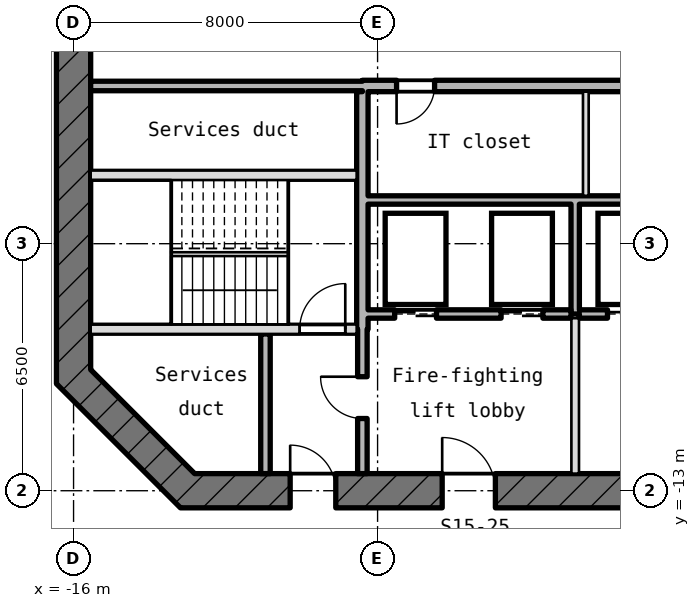
"""IFC4 building model, lengths in metres.
Left out: names, types, materials, properties, quantities, classifications, styles, units other than length and angle.
Written with IfcOpenShell. Run it as: python <this file> out.ifc"""

import sys

from ifc_helpers import new_model, si_unit, direction, frame, frame_2d, origin, place, context, subcontext, project, spatial, rectangle, extrude, element, fill, save


model = new_model("IFC4")
c1 = context("Model", 3, precision=1e-05, world=origin(), true_north=direction((0.0, 1.0)))
c2 = subcontext(c1, "Body", "Model", "MODEL_VIEW")
j1 = project(units=[si_unit("LENGTHUNIT", "METRE"), si_unit("PLANEANGLEUNIT", "RADIAN")], contexts=[c1])
p1 = place(None, origin())
s1 = spatial("IfcSite", under=j1, at=p1, CompositionType="ELEMENT")
p2 = place(p1, origin())
s2 = spatial("IfcBuilding", under=s1, at=p2, CompositionType="ELEMENT")
p3 = place(p2, frame((0.0, 0.0, 223.3)))
s3 = spatial("IfcBuildingStorey", under=s2, at=p3, CompositionType="ELEMENT", Elevation=223.3)
p4 = place(p3, frame((-16.0, 10.186, -0.18), z_axis=(0.0, 0.0, 1.0), x_axis=(0.0, -1.0, 0.0)))
e1 = element("IfcWall", 1, at=p4, inside=s3, PredefinedType="SHEAR", context=c2, shape_type="SweptSolid", body=[
    extrude(rectangle(XDim=20.373, YDim=0.9, at=frame_2d((10.186, 0.0))), origin(), (0.0, 0.0, 1.0), 4.15),
])
p5 = place(p4, frame((8.986, 0.0, 0.18)))
e2 = element("IfcOpeningElement", 2, at=p5, cuts=e1, PredefinedType="OPENING", context=c2, shape_type="SweptSolid", body=[
    extrude(rectangle(XDim=2.4, YDim=2.1, at=frame_2d((1.2, 1.05))), frame((0.0, 0.46, 0.0), z_axis=(0.0, -1.0, 0.0), x_axis=(1.0, 0.0, 0.0)), (0.0, 0.0, 1.0), 0.92),
])
p6 = place(p4, frame((5.586, 0.0, 0.18)))
e3 = element("IfcOpeningElement", 3, at=p6, cuts=e1, PredefinedType="OPENING", context=c2, shape_type="SweptSolid", body=[
    extrude(rectangle(XDim=1.2, YDim=2.1, at=frame_2d((0.6, 1.05))), frame((0.0, 0.46, 0.0), z_axis=(0.0, -1.0, 0.0), x_axis=(1.0, 0.0, 0.0)), (0.0, 0.0, 1.0), 0.92),
])
p7 = place(p3, frame((-16.132, -9.868, -0.18), z_axis=(0.0, 0.0, 1.0), x_axis=(0.707106781187, -0.707106781187, 0.0)))
e4 = element("IfcWall", 4, at=p7, inside=s3, PredefinedType="SHEAR", context=c2, shape_type="SweptSolid", body=[
    extrude(rectangle(XDim=4.615, YDim=0.9, at=frame_2d((2.308, 0.0))), origin(), (0.0, 0.0, 1.0), 4.15),
])
p8 = place(p3, frame((-13.186, -13.0, -0.18), z_axis=(0.0, 0.0, 1.0), x_axis=(1.0, 0.0, 0.0)))
e5 = element("IfcWall", 5, at=p8, inside=s3, PredefinedType="SHEAR", context=c2, shape_type="SweptSolid", body=[
    extrude(rectangle(XDim=26.373, YDim=0.9, at=frame_2d((13.186, 0.0))), origin(), (0.0, 0.0, 1.0), 4.15),
])
p9 = place(p8, frame((2.886, 0.0, 0.18)))
e6 = element("IfcOpeningElement", 6, at=p9, cuts=e5, PredefinedType="OPENING", context=c2, shape_type="SweptSolid", body=[
    extrude(rectangle(XDim=1.2, YDim=2.1, at=frame_2d((0.6, 1.05))), frame((0.0, 0.46, 0.0), z_axis=(0.0, -1.0, 0.0), x_axis=(1.0, 0.0, 0.0)), (0.0, 0.0, 1.0), 0.92),
])
p10 = place(p8, frame((6.886, 0.0, 0.18)))
e7 = element("IfcOpeningElement", 7, at=p10, cuts=e5, PredefinedType="OPENING", context=c2, shape_type="SweptSolid", body=[
    extrude(rectangle(XDim=1.4, YDim=2.1, at=frame_2d((0.7, 1.05))), frame((0.0, 0.46, 0.0), z_axis=(0.0, -1.0, 0.0), x_axis=(1.0, 0.0, 0.0)), (0.0, 0.0, 1.0), 0.92),
])
p11 = place(p8, frame((15.486, 0.0, 0.18)))
e8 = element("IfcOpeningElement", 8, at=p11, cuts=e5, PredefinedType="OPENING", context=c2, shape_type="SweptSolid", body=[
    extrude(rectangle(XDim=1.4, YDim=2.1, at=frame_2d((0.7, 1.05))), frame((0.0, 0.46, 0.0), z_axis=(0.0, -1.0, 0.0), x_axis=(1.0, 0.0, 0.0)), (0.0, 0.0, 1.0), 0.92),
])
p12 = place(p3, frame((-15.55, -8.75, -0.18), z_axis=(0.0, 0.0, 1.0), x_axis=(1.0, 0.0, 0.0)))
e9 = element("IfcWall", 9, at=p12, inside=s3, PredefinedType="SHEAR", context=c2, shape_type="SweptSolid", body=[
    extrude(rectangle(XDim=7.0, YDim=0.25, at=frame_2d((3.5, 0.0))), origin(), (0.0, 0.0, 1.0), 4.15),
])
p13 = place(p12, frame((5.5, 0.0, 0.18)))
e10 = element("IfcOpeningElement", 10, at=p13, cuts=e9, PredefinedType="OPENING", context=c2, shape_type="SweptSolid", body=[
    extrude(rectangle(XDim=1.2, YDim=2.1, at=frame_2d((0.6, 1.05))), frame((0.0, 0.135, 0.0), z_axis=(0.0, -1.0, 0.0), x_axis=(1.0, 0.0, 0.0)), (0.0, 0.0, 1.0), 0.27),
])
p14 = place(p3, frame((-8.25, -8.35, 0.0), z_axis=(0.0, 0.0, 1.0), x_axis=(1.0, 0.0, 0.0)))
e11 = element("IfcWall", 11, at=p14, inside=s3, PredefinedType="STANDARD", context=c2, shape_type="SweptSolid", body=[
    extrude(rectangle(XDim=5.34, YDim=0.22, at=frame_2d((2.67, 0.0))), origin(), (0.0, 0.0, 1.0), 3.97),
])
p15 = place(p14, frame((0.7, 0.0, 0.0)))
e12 = element("IfcOpeningElement", 12, at=p15, cuts=e11, PredefinedType="OPENING", context=c2, shape_type="SweptSolid", body=[
    extrude(rectangle(XDim=1.1, YDim=2.1, at=frame_2d((0.55, 1.05))), frame((0.0, 0.12, 0.0), z_axis=(0.0, -1.0, 0.0), x_axis=(1.0, 0.0, 0.0)), (0.0, 0.0, 1.0), 0.24),
])
p16 = place(p14, frame((3.5, 0.0, 0.0)))
e13 = element("IfcOpeningElement", 13, at=p16, cuts=e11, PredefinedType="OPENING", context=c2, shape_type="SweptSolid", body=[
    extrude(rectangle(XDim=1.1, YDim=2.1, at=frame_2d((0.55, 1.05))), frame((0.0, 0.12, 0.0), z_axis=(0.0, -1.0, 0.0), x_axis=(1.0, 0.0, 0.0)), (0.0, 0.0, 1.0), 0.24),
])
p17 = place(p3, frame((-2.69, -8.35, 0.0), z_axis=(0.0, 0.0, 1.0), x_axis=(1.0, 0.0, 0.0)))
e14 = element("IfcWall", 14, at=p17, inside=s3, PredefinedType="STANDARD", context=c2, shape_type="SweptSolid", body=[
    extrude(rectangle(XDim=10.94, YDim=0.22, at=frame_2d((5.47, 0.0))), origin(), (0.0, 0.0, 1.0), 3.97),
])
p18 = place(p17, frame((0.74, 0.0, 0.0)))
e15 = element("IfcOpeningElement", 15, at=p18, cuts=e14, PredefinedType="OPENING", context=c2, shape_type="SweptSolid", body=[
    extrude(rectangle(XDim=1.1, YDim=2.1, at=frame_2d((0.55, 1.05))), frame((0.0, 0.12, 0.0), z_axis=(0.0, -1.0, 0.0), x_axis=(1.0, 0.0, 0.0)), (0.0, 0.0, 1.0), 0.24),
])
p19 = place(p17, frame((3.54, 0.0, 0.0)))
e16 = element("IfcOpeningElement", 16, at=p19, cuts=e14, PredefinedType="OPENING", context=c2, shape_type="SweptSolid", body=[
    extrude(rectangle(XDim=1.1, YDim=2.1, at=frame_2d((0.55, 1.05))), frame((0.0, 0.12, 0.0), z_axis=(0.0, -1.0, 0.0), x_axis=(1.0, 0.0, 0.0)), (0.0, 0.0, 1.0), 0.24),
])
p20 = place(p3, frame((-8.25, -5.35, 0.0), z_axis=(0.0, 0.0, 1.0), x_axis=(1.0, 0.0, 0.0)))
e17 = element("IfcWall", 17, at=p20, inside=s3, PredefinedType="STANDARD", context=c2, shape_type="SweptSolid", body=[
    extrude(rectangle(XDim=16.5, YDim=0.22, at=frame_2d((8.25, 0.0))), origin(), (0.0, 0.0, 1.0), 3.97),
])
p21 = place(p3, frame((-15.55, -4.7, -0.18), z_axis=(0.0, 0.0, 1.0), x_axis=(1.0, 0.0, 0.0)))
e18 = element("IfcWall", 18, at=p21, inside=s3, PredefinedType="SHEAR", context=c2, shape_type="SweptSolid", body=[
    extrude(rectangle(XDim=7.0, YDim=0.25, at=frame_2d((3.5, 0.0))), origin(), (0.0, 0.0, 1.0), 4.15),
])
p22 = place(p3, frame((-15.55, -2.35, 0.0), z_axis=(0.0, 0.0, 1.0), x_axis=(1.0, 0.0, 0.0)))
e19 = element("IfcWall", 19, at=p22, inside=s3, PredefinedType="STANDARD", context=c2, shape_type="SweptSolid", body=[
    extrude(rectangle(XDim=7.15, YDim=0.25, at=frame_2d((3.575, 0.0))), origin(), (0.0, 0.0, 1.0), 3.97),
])
p23 = place(p3, frame((-8.4, -2.35, -0.18), z_axis=(0.0, 0.0, 1.0), x_axis=(1.0, 0.0, 0.0)))
e20 = element("IfcWall", 20, at=p23, inside=s3, PredefinedType="SHEAR", context=c2, shape_type="SweptSolid", body=[
    extrude(rectangle(XDim=16.8, YDim=0.3, at=frame_2d((8.4, 0.0))), origin(), (0.0, 0.0, 1.0), 4.15),
])
p24 = place(p23, frame((0.9, 0.0, 0.18)))
e21 = element("IfcOpeningElement", 21, at=p24, cuts=e20, PredefinedType="OPENING", context=c2, shape_type="SweptSolid", body=[
    extrude(rectangle(XDim=1.0, YDim=2.1, at=frame_2d((0.5, 1.05))), frame((0.0, 0.16, 0.0), z_axis=(0.0, -1.0, 0.0), x_axis=(1.0, 0.0, 0.0)), (0.0, 0.0, 1.0), 0.32),
])
p25 = place(p23, frame((14.9, 0.0, 0.18)))
e22 = element("IfcOpeningElement", 22, at=p25, cuts=e20, PredefinedType="OPENING", context=c2, shape_type="SweptSolid", body=[
    extrude(rectangle(XDim=1.0, YDim=2.1, at=frame_2d((0.5, 1.05))), frame((0.0, 0.16, 0.0), z_axis=(0.0, -1.0, 0.0), x_axis=(1.0, 0.0, 0.0)), (0.0, 0.0, 1.0), 0.32),
])
p26 = place(p3, frame((-10.95, -12.55, 0.0), z_axis=(0.0, 0.0, 1.0), x_axis=(0.0, 1.0, 0.0)))
e23 = element("IfcWall", 23, at=p26, inside=s3, PredefinedType="STANDARD", context=c2, shape_type="SweptSolid", body=[
    extrude(rectangle(XDim=3.675, YDim=0.25, at=frame_2d((1.837, 0.0))), origin(), (0.0, 0.0, 1.0), 3.97),
])
p27 = place(p3, frame((-8.4, -12.55, 0.0), z_axis=(0.0, 0.0, 1.0), x_axis=(0.0, 1.0, 0.0)))
e24 = element("IfcWall", 24, at=p27, inside=s3, PredefinedType="STANDARD", context=c2, shape_type="SweptSolid", body=[
    extrude(rectangle(XDim=3.8, YDim=0.25, at=frame_2d((1.9, 0.0))), origin(), (0.0, 0.0, 1.0), 3.97),
])
p28 = place(p27, frame((1.45, 0.0, 0.0)))
e25 = element("IfcOpeningElement", 25, at=p28, cuts=e24, PredefinedType="OPENING", context=c2, shape_type="SweptSolid", body=[
    extrude(rectangle(XDim=1.1, YDim=2.1, at=frame_2d((0.55, 1.05))), frame((0.0, 0.135, 0.0), z_axis=(0.0, -1.0, 0.0), x_axis=(1.0, 0.0, 0.0)), (0.0, 0.0, 1.0), 0.27),
])
p29 = place(p3, frame((-8.4, -8.75, -0.18), z_axis=(0.0, 0.0, 1.0), x_axis=(0.0, 1.0, 0.0)))
e26 = element("IfcWall", 26, at=p29, inside=s3, PredefinedType="SHEAR", context=c2, shape_type="SweptSolid", body=[
    extrude(rectangle(XDim=6.25, YDim=0.3, at=frame_2d((3.125, 0.0))), origin(), (0.0, 0.0, 1.0), 4.15),
])
p30 = place(p3, frame((-2.8, -12.55, 0.0), z_axis=(0.0, 0.0, 1.0), x_axis=(0.0, 1.0, 0.0)))
e27 = element("IfcWall", 27, at=p30, inside=s3, PredefinedType="PARTITIONING", context=c2, shape_type="SweptSolid", body=[
    extrude(rectangle(XDim=4.09, YDim=0.2, at=frame_2d((2.045, 0.0))), origin(), (0.0, 0.0, 1.0), 3.97),
])
p31 = place(p3, frame((-2.8, -8.35, 0.0), z_axis=(0.0, 0.0, 1.0), x_axis=(0.0, 1.0, 0.0)))
e28 = element("IfcWall", 28, at=p31, inside=s3, PredefinedType="STANDARD", context=c2, shape_type="SweptSolid", body=[
    extrude(rectangle(XDim=2.89, YDim=0.22, at=frame_2d((1.445, 0.0))), origin(), (0.0, 0.0, 1.0), 3.97),
])
p32 = place(p3, frame((-2.52, -5.24, 0.0), z_axis=(0.0, 0.0, 1.0), x_axis=(0.0, 1.0, 0.0)))
e29 = element("IfcWall", 29, at=p32, inside=s3, PredefinedType="PARTITIONING", context=c2, shape_type="SweptSolid", body=[
    extrude(rectangle(XDim=2.74, YDim=0.15, at=frame_2d((1.37, 0.0))), origin(), (0.0, 0.0, 1.0), 3.97),
])
p33 = place(p15, origin())
e30 = element("IfcDoor", 30, at=p33, inside=s3, OperationType="DOUBLE_DOOR_SLIDING", PredefinedType="DOOR", context=c2, shape_type="SweptSolid", body=[
    extrude(rectangle(XDim=1.1, YDim=2.1, at=frame_2d((0.55, 1.05))), frame((0.0, 0.025, 0.0), z_axis=(0.0, -1.0, 0.0), x_axis=(1.0, 0.0, 0.0)), (0.0, 0.0, 1.0), 0.05),
])
fill(e12, e30)
p34 = place(p16, origin())
e31 = element("IfcDoor", 31, at=p34, inside=s3, OperationType="DOUBLE_DOOR_SLIDING", PredefinedType="DOOR", context=c2, shape_type="SweptSolid", body=[
    extrude(rectangle(XDim=1.1, YDim=2.1, at=frame_2d((0.55, 1.05))), frame((0.0, 0.025, 0.0), z_axis=(0.0, -1.0, 0.0), x_axis=(1.0, 0.0, 0.0)), (0.0, 0.0, 1.0), 0.05),
])
fill(e13, e31)
p35 = place(p18, origin())
e32 = element("IfcDoor", 32, at=p35, inside=s3, OperationType="DOUBLE_DOOR_SLIDING", PredefinedType="DOOR", context=c2, shape_type="SweptSolid", body=[
    extrude(rectangle(XDim=1.1, YDim=2.1, at=frame_2d((0.55, 1.05))), frame((0.0, 0.025, 0.0), z_axis=(0.0, -1.0, 0.0), x_axis=(1.0, 0.0, 0.0)), (0.0, 0.0, 1.0), 0.05),
])
fill(e15, e32)
p36 = place(p13, origin())
e33 = element("IfcDoor", 33, at=p36, inside=s3, OperationType="SINGLE_SWING_RIGHT", PredefinedType="DOOR", context=c2, shape_type="SweptSolid", body=[
    extrude(rectangle(XDim=1.2, YDim=2.1, at=frame_2d((0.6, 1.05))), frame((0.0, 0.025, 0.0), z_axis=(0.0, -1.0, 0.0), x_axis=(1.0, 0.0, 0.0)), (0.0, 0.0, 1.0), 0.05),
])
fill(e10, e33)
p37 = place(p28, origin())
e34 = element("IfcDoor", 34, at=p37, inside=s3, OperationType="SINGLE_SWING_RIGHT", PredefinedType="DOOR", context=c2, shape_type="SweptSolid", body=[
    extrude(rectangle(XDim=1.1, YDim=2.1, at=frame_2d((0.55, 1.05))), frame((0.0, 0.025, 0.0), z_axis=(0.0, -1.0, 0.0), x_axis=(1.0, 0.0, 0.0)), (0.0, 0.0, 1.0), 0.05),
])
fill(e25, e34)
p38 = place(p9, origin())
e35 = element("IfcDoor", 35, at=p38, inside=s3, OperationType="SINGLE_SWING_RIGHT", PredefinedType="DOOR", context=c2, shape_type="SweptSolid", body=[
    extrude(rectangle(XDim=1.2, YDim=2.1, at=frame_2d((0.6, 1.05))), frame((0.0, 0.025, 0.0), z_axis=(0.0, -1.0, 0.0), x_axis=(1.0, 0.0, 0.0)), (0.0, 0.0, 1.0), 0.05),
])
fill(e6, e35)
p39 = place(p10, origin())
e36 = element("IfcDoor", 36, at=p39, inside=s3, OperationType="SINGLE_SWING_RIGHT", PredefinedType="DOOR", context=c2, shape_type="SweptSolid", body=[
    extrude(rectangle(XDim=1.4, YDim=2.1, at=frame_2d((0.7, 1.05))), frame((0.0, 0.025, 0.0), z_axis=(0.0, -1.0, 0.0), x_axis=(1.0, 0.0, 0.0)), (0.0, 0.0, 1.0), 0.05),
])
fill(e7, e36)
p40 = place(p24, frame((1.0, 0.0, 0.0), z_axis=(0.0, 0.0, 1.0), x_axis=(-1.0, 0.0, 0.0)))
e37 = element("IfcDoor", 37, at=p40, inside=s3, OperationType="SINGLE_SWING_LEFT", PredefinedType="DOOR", context=c2, shape_type="SweptSolid", body=[
    extrude(rectangle(XDim=1.0, YDim=2.1, at=frame_2d((0.5, 1.05))), frame((0.0, 0.025, 0.0), z_axis=(0.0, -1.0, 0.0), x_axis=(1.0, 0.0, 0.0)), (0.0, 0.0, 1.0), 0.05),
])
fill(e21, e37)
save(model, sys.argv[1])
